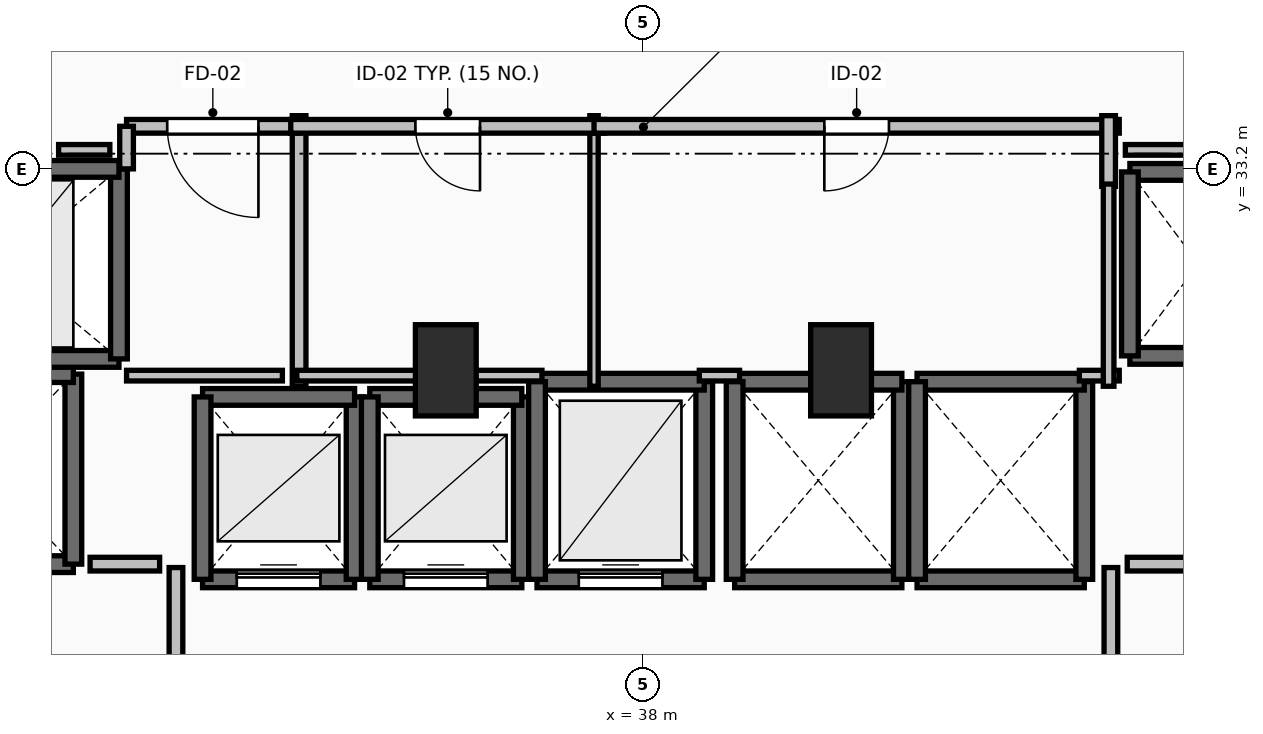
"""IFC4 building model, lengths in metres.
Left out: names, types, materials, properties, quantities, classifications, styles, units other than length and angle.
Written with IfcOpenShell. Run it as: python <this file> out.ifc"""

import sys

from ifc_helpers import new_model, si_unit, direction, frame, frame_2d, origin, origin_2d, place, context, subcontext, project, spatial, rectangle, extrude, element, fill, save


model = new_model("IFC4")
c1 = context("Model", 3, precision=1e-05, world=origin(), true_north=direction((0.0, 1.0)))
c2 = subcontext(c1, "Body", "Model", "MODEL_VIEW")
j1 = project(units=[si_unit("LENGTHUNIT", "METRE"), si_unit("PLANEANGLEUNIT", "RADIAN")], contexts=[c1])
p1 = place(None, origin())
s1 = spatial("IfcSite", under=j1, at=p1, CompositionType="ELEMENT")
p2 = place(p1, origin())
s2 = spatial("IfcBuilding", under=s1, at=p2, CompositionType="ELEMENT")
p3 = place(p2, frame((0.0, 0.0, 120.8)))
s3 = spatial("IfcBuildingStorey", under=s2, at=p3, CompositionType="ELEMENT", Elevation=120.8)
for number, where, z_axis, x_axis in (
    (1, (35.4, 30.55, 0.0), (0.0, 0.0, 1.0), (1.0, 0.0, 0.0)),
    (2, (40.6, 30.55, 0.0), (0.0, 0.0, 1.0), (1.0, 0.0, 0.0)),
):
    element("IfcColumn", number, at=place(p3, frame(where, z_axis=z_axis, x_axis=x_axis)), inside=s3, PredefinedType="PILASTER", context=c2, shape_type="SweptSolid", body=[
        extrude(rectangle(XDim=0.8, YDim=1.2, at=origin_2d()), origin(), (0.0, 0.0, 1.0), 3.5),
    ])
p4 = place(p3, frame((32.2, 27.8, 0.0), z_axis=(0.0, 0.0, 1.0), x_axis=(1.0, 0.0, 0.0)))
e3 = element("IfcWall", 3, at=p4, inside=s3, PredefinedType="SOLIDWALL", context=c2, shape_type="SweptSolid", body=[
    extrude(rectangle(XDim=2.0, YDim=0.22, at=frame_2d((1.0, 0.0))), origin(), (0.0, 0.0, 1.0), 3.15),
])
p5 = place(p4, frame((0.45, 0.0, 0.0)))
e4 = element("IfcOpeningElement", 4, at=p5, cuts=e3, PredefinedType="OPENING", context=c2, shape_type="SweptSolid", body=[
    extrude(rectangle(XDim=1.1, YDim=2.2, at=frame_2d((0.55, 1.1))), frame((0.0, 0.125, 0.0), z_axis=(0.0, -1.0, 0.0), x_axis=(1.0, 0.0, 0.0)), (0.0, 0.0, 1.0), 0.25),
])
p6 = place(p3, frame((34.2, 27.8, 0.0), z_axis=(0.0, 0.0, 1.0), x_axis=(0.0, 1.0, 0.0)))
e5 = element("IfcWall", 5, at=p6, inside=s3, PredefinedType="SOLIDWALL", context=c2, shape_type="SweptSolid", body=[
    extrude(rectangle(XDim=2.4, YDim=0.22, at=frame_2d((1.2, 0.0))), origin(), (0.0, 0.0, 1.0), 3.15),
])
p7 = place(p3, frame((34.2, 30.2, 0.0), z_axis=(0.0, 0.0, 1.0), x_axis=(-1.0, 0.0, 0.0)))
e6 = element("IfcWall", 6, at=p7, inside=s3, PredefinedType="SOLIDWALL", context=c2, shape_type="SweptSolid", body=[
    extrude(rectangle(XDim=2.0, YDim=0.22, at=frame_2d((1.0, 0.0))), origin(), (0.0, 0.0, 1.0), 3.15),
])
p8 = place(p3, frame((32.2, 30.2, 0.0), z_axis=(0.0, 0.0, 1.0), x_axis=(0.0, -1.0, 0.0)))
e7 = element("IfcWall", 7, at=p8, inside=s3, PredefinedType="SOLIDWALL", context=c2, shape_type="SweptSolid", body=[
    extrude(rectangle(XDim=2.4, YDim=0.22, at=frame_2d((1.2, 0.0))), origin(), (0.0, 0.0, 1.0), 3.15),
])
p9 = place(p3, frame((34.4, 27.8, 0.0), z_axis=(0.0, 0.0, 1.0), x_axis=(1.0, 0.0, 0.0)))
e8 = element("IfcWall", 8, at=p9, inside=s3, PredefinedType="SOLIDWALL", context=c2, shape_type="SweptSolid", body=[
    extrude(rectangle(XDim=2.0, YDim=0.22, at=frame_2d((1.0, 0.0))), origin(), (0.0, 0.0, 1.0), 3.15),
])
p10 = place(p9, frame((0.45, 0.0, 0.0)))
e9 = element("IfcOpeningElement", 9, at=p10, cuts=e8, PredefinedType="OPENING", context=c2, shape_type="SweptSolid", body=[
    extrude(rectangle(XDim=1.1, YDim=2.2, at=frame_2d((0.55, 1.1))), frame((0.0, 0.125, 0.0), z_axis=(0.0, -1.0, 0.0), x_axis=(1.0, 0.0, 0.0)), (0.0, 0.0, 1.0), 0.25),
])
p11 = place(p3, frame((36.4, 27.8, 0.0), z_axis=(0.0, 0.0, 1.0), x_axis=(0.0, 1.0, 0.0)))
e10 = element("IfcWall", 10, at=p11, inside=s3, PredefinedType="SOLIDWALL", context=c2, shape_type="SweptSolid", body=[
    extrude(rectangle(XDim=2.4, YDim=0.22, at=frame_2d((1.2, 0.0))), origin(), (0.0, 0.0, 1.0), 3.15),
])
p12 = place(p3, frame((36.4, 30.2, 0.0), z_axis=(0.0, 0.0, 1.0), x_axis=(-1.0, 0.0, 0.0)))
e11 = element("IfcWall", 11, at=p12, inside=s3, PredefinedType="SOLIDWALL", context=c2, shape_type="SweptSolid", body=[
    extrude(rectangle(XDim=2.0, YDim=0.22, at=frame_2d((1.0, 0.0))), origin(), (0.0, 0.0, 1.0), 3.15),
])
p13 = place(p3, frame((34.4, 30.2, 0.0), z_axis=(0.0, 0.0, 1.0), x_axis=(0.0, -1.0, 0.0)))
e12 = element("IfcWall", 12, at=p13, inside=s3, PredefinedType="SOLIDWALL", context=c2, shape_type="SweptSolid", body=[
    extrude(rectangle(XDim=2.4, YDim=0.22, at=frame_2d((1.2, 0.0))), origin(), (0.0, 0.0, 1.0), 3.15),
])
p14 = place(p3, frame((36.6, 27.8, 0.0), z_axis=(0.0, 0.0, 1.0), x_axis=(1.0, 0.0, 0.0)))
e13 = element("IfcWall", 13, at=p14, inside=s3, PredefinedType="SOLIDWALL", context=c2, shape_type="SweptSolid", body=[
    extrude(rectangle(XDim=2.2, YDim=0.22, at=frame_2d((1.1, 0.0))), origin(), (0.0, 0.0, 1.0), 3.15),
])
p15 = place(p14, frame((0.55, 0.0, 0.0)))
e14 = element("IfcOpeningElement", 14, at=p15, cuts=e13, PredefinedType="OPENING", context=c2, shape_type="SweptSolid", body=[
    extrude(rectangle(XDim=1.1, YDim=2.2, at=frame_2d((0.55, 1.1))), frame((0.0, 0.125, 0.0), z_axis=(0.0, -1.0, 0.0), x_axis=(1.0, 0.0, 0.0)), (0.0, 0.0, 1.0), 0.25),
])
p16 = place(p3, frame((38.8, 27.8, 0.0), z_axis=(0.0, 0.0, 1.0), x_axis=(0.0, 1.0, 0.0)))
e15 = element("IfcWall", 15, at=p16, inside=s3, PredefinedType="SOLIDWALL", context=c2, shape_type="SweptSolid", body=[
    extrude(rectangle(XDim=2.6, YDim=0.22, at=frame_2d((1.3, 0.0))), origin(), (0.0, 0.0, 1.0), 3.15),
])
p17 = place(p3, frame((38.8, 30.4, 0.0), z_axis=(0.0, 0.0, 1.0), x_axis=(-1.0, 0.0, 0.0)))
e16 = element("IfcWall", 16, at=p17, inside=s3, PredefinedType="SOLIDWALL", context=c2, shape_type="SweptSolid", body=[
    extrude(rectangle(XDim=2.2, YDim=0.22, at=frame_2d((1.1, 0.0))), origin(), (0.0, 0.0, 1.0), 3.15),
])
p18 = place(p3, frame((36.6, 30.4, 0.0), z_axis=(0.0, 0.0, 1.0), x_axis=(0.0, -1.0, 0.0)))
e17 = element("IfcWall", 17, at=p18, inside=s3, PredefinedType="SOLIDWALL", context=c2, shape_type="SweptSolid", body=[
    extrude(rectangle(XDim=2.6, YDim=0.22, at=frame_2d((1.3, 0.0))), origin(), (0.0, 0.0, 1.0), 3.15),
])
p19 = place(p3, frame((39.2, 27.8, 0.0), z_axis=(0.0, 0.0, 1.0), x_axis=(1.0, 0.0, 0.0)))
e18 = element("IfcWall", 18, at=p19, inside=s3, PredefinedType="SOLIDWALL", context=c2, shape_type="SweptSolid", body=[
    extrude(rectangle(XDim=2.2, YDim=0.22, at=frame_2d((1.1, 0.0))), origin(), (0.0, 0.0, 1.0), 3.15),
])
p20 = place(p3, frame((41.4, 27.8, 0.0), z_axis=(0.0, 0.0, 1.0), x_axis=(0.0, 1.0, 0.0)))
e19 = element("IfcWall", 19, at=p20, inside=s3, PredefinedType="SOLIDWALL", context=c2, shape_type="SweptSolid", body=[
    extrude(rectangle(XDim=2.6, YDim=0.22, at=frame_2d((1.3, 0.0))), origin(), (0.0, 0.0, 1.0), 3.15),
])
p21 = place(p3, frame((41.4, 30.4, 0.0), z_axis=(0.0, 0.0, 1.0), x_axis=(-1.0, 0.0, 0.0)))
e20 = element("IfcWall", 20, at=p21, inside=s3, PredefinedType="SOLIDWALL", context=c2, shape_type="SweptSolid", body=[
    extrude(rectangle(XDim=2.2, YDim=0.22, at=frame_2d((1.1, 0.0))), origin(), (0.0, 0.0, 1.0), 3.15),
])
p22 = place(p3, frame((39.2, 30.4, 0.0), z_axis=(0.0, 0.0, 1.0), x_axis=(0.0, -1.0, 0.0)))
e21 = element("IfcWall", 21, at=p22, inside=s3, PredefinedType="SOLIDWALL", context=c2, shape_type="SweptSolid", body=[
    extrude(rectangle(XDim=2.6, YDim=0.22, at=frame_2d((1.3, 0.0))), origin(), (0.0, 0.0, 1.0), 3.15),
])
p23 = place(p3, frame((41.6, 27.8, 0.0), z_axis=(0.0, 0.0, 1.0), x_axis=(1.0, 0.0, 0.0)))
e22 = element("IfcWall", 22, at=p23, inside=s3, PredefinedType="SOLIDWALL", context=c2, shape_type="SweptSolid", body=[
    extrude(rectangle(XDim=2.2, YDim=0.22, at=frame_2d((1.1, 0.0))), origin(), (0.0, 0.0, 1.0), 3.15),
])
p24 = place(p3, frame((43.8, 27.8, 0.0), z_axis=(0.0, 0.0, 1.0), x_axis=(0.0, 1.0, 0.0)))
e23 = element("IfcWall", 23, at=p24, inside=s3, PredefinedType="SOLIDWALL", context=c2, shape_type="SweptSolid", body=[
    extrude(rectangle(XDim=2.6, YDim=0.22, at=frame_2d((1.3, 0.0))), origin(), (0.0, 0.0, 1.0), 3.15),
])
p25 = place(p3, frame((43.8, 30.4, 0.0), z_axis=(0.0, 0.0, 1.0), x_axis=(-1.0, 0.0, 0.0)))
e24 = element("IfcWall", 24, at=p25, inside=s3, PredefinedType="SOLIDWALL", context=c2, shape_type="SweptSolid", body=[
    extrude(rectangle(XDim=2.2, YDim=0.22, at=frame_2d((1.1, 0.0))), origin(), (0.0, 0.0, 1.0), 3.15),
])
p26 = place(p3, frame((41.6, 30.4, 0.0), z_axis=(0.0, 0.0, 1.0), x_axis=(0.0, -1.0, 0.0)))
e25 = element("IfcWall", 25, at=p26, inside=s3, PredefinedType="SOLIDWALL", context=c2, shape_type="SweptSolid", body=[
    extrude(rectangle(XDim=2.6, YDim=0.22, at=frame_2d((1.3, 0.0))), origin(), (0.0, 0.0, 1.0), 3.15),
])
for number, where, z_axis, x_axis in (
    (26, (44.4, 30.74, 0.0), (0.0, 0.0, 1.0), (1.0, 0.0, 0.0)),
    (27, (46.2, 33.16, 0.0), (0.0, 0.0, 1.0), (-1.0, 0.0, 0.0)),
):
    element("IfcWall", number, at=place(p3, frame(where, z_axis=z_axis, x_axis=x_axis)), inside=s3, PredefinedType="SOLIDWALL", context=c2, shape_type="SweptSolid", body=[
        extrude(rectangle(XDim=1.8, YDim=0.22, at=frame_2d((0.9, 0.0))), origin(), (0.0, 0.0, 1.0), 3.15),
    ])
p27 = place(p3, frame((44.4, 33.16, 0.0), z_axis=(0.0, 0.0, 1.0), x_axis=(0.0, -1.0, 0.0)))
e28 = element("IfcWall", 28, at=p27, inside=s3, PredefinedType="SOLIDWALL", context=c2, shape_type="SweptSolid", body=[
    extrude(rectangle(XDim=2.42, YDim=0.22, at=frame_2d((1.21, 0.0))), origin(), (0.0, 0.0, 1.0), 3.15),
])
p28 = place(p3, frame((28.1, 28.0, 0.0), z_axis=(0.0, 0.0, 1.0), x_axis=(1.0, 0.0, 0.0)))
e29 = element("IfcWall", 29, at=p28, inside=s3, PredefinedType="SHEAR", context=c2, shape_type="SweptSolid", body=[
    extrude(rectangle(XDim=2.4, YDim=0.22, at=frame_2d((1.2, 0.0))), origin(), (0.0, 0.0, 1.0), 3.15),
])
p29 = place(p28, frame((0.6, 0.0, 0.0)))
e30 = element("IfcOpeningElement", 30, at=p29, cuts=e29, PredefinedType="OPENING", context=c2, shape_type="SweptSolid", body=[
    extrude(rectangle(XDim=1.2, YDim=2.2, at=frame_2d((0.6, 1.1))), frame((0.0, 0.125, 0.0), z_axis=(0.0, -1.0, 0.0), x_axis=(1.0, 0.0, 0.0)), (0.0, 0.0, 1.0), 0.25),
])
p30 = place(p3, frame((30.5, 28.0, 0.0), z_axis=(0.0, 0.0, 1.0), x_axis=(0.0, 1.0, 0.0)))
e31 = element("IfcWall", 31, at=p30, inside=s3, PredefinedType="SHEAR", context=c2, shape_type="SweptSolid", body=[
    extrude(rectangle(XDim=2.5, YDim=0.22, at=frame_2d((1.25, 0.0))), origin(), (0.0, 0.0, 1.0), 3.15),
])
p31 = place(p3, frame((30.5, 30.5, 0.0), z_axis=(0.0, 0.0, 1.0), x_axis=(-1.0, 0.0, 0.0)))
e32 = element("IfcWall", 32, at=p31, inside=s3, PredefinedType="SHEAR", context=c2, shape_type="SweptSolid", body=[
    extrude(rectangle(XDim=2.4, YDim=0.22, at=frame_2d((1.2, 0.0))), origin(), (0.0, 0.0, 1.0), 3.15),
])
p32 = place(p3, frame((28.1, 30.7, 0.0), z_axis=(0.0, 0.0, 1.0), x_axis=(1.0, 0.0, 0.0)))
e33 = element("IfcWall", 33, at=p32, inside=s3, PredefinedType="SOLIDWALL", context=c2, shape_type="SweptSolid", body=[
    extrude(rectangle(XDim=3.0, YDim=0.22, at=frame_2d((1.5, 0.0))), origin(), (0.0, 0.0, 1.0), 3.15),
])
p33 = place(p3, frame((31.1, 30.7, 0.0), z_axis=(0.0, 0.0, 1.0), x_axis=(0.0, 1.0, 0.0)))
e34 = element("IfcWall", 34, at=p33, inside=s3, PredefinedType="SOLIDWALL", context=c2, shape_type="SweptSolid", body=[
    extrude(rectangle(XDim=2.5, YDim=0.22, at=frame_2d((1.25, 0.0))), origin(), (0.0, 0.0, 1.0), 3.15),
])
p34 = place(p3, frame((31.1, 33.2, 0.0), z_axis=(0.0, 0.0, 1.0), x_axis=(-1.0, 0.0, 0.0)))
e35 = element("IfcWall", 35, at=p34, inside=s3, PredefinedType="SOLIDWALL", context=c2, shape_type="SweptSolid", body=[
    extrude(rectangle(XDim=3.0, YDim=0.22, at=frame_2d((1.5, 0.0))), origin(), (0.0, 0.0, 1.0), 3.15),
])
p35 = place(p34, frame((0.9, 0.0, 0.0)))
e36 = element("IfcOpeningElement", 36, at=p35, cuts=e35, PredefinedType="OPENING", context=c2, shape_type="SweptSolid", body=[
    extrude(rectangle(XDim=1.2, YDim=2.2, at=frame_2d((0.6, 1.1))), frame((0.0, 0.125, 0.0), z_axis=(0.0, -1.0, 0.0), x_axis=(1.0, 0.0, 0.0)), (0.0, 0.0, 1.0), 0.25),
])
p36 = place(p3, frame((31.85, 24.045, 0.0), z_axis=(0.0, 0.0, 1.0), x_axis=(0.0, 1.0, 0.0)))
e37 = element("IfcWall", 37, at=p36, inside=s3, PredefinedType="PARTITIONING", context=c2, shape_type="SweptSolid", body=[
    extrude(rectangle(XDim=3.91, YDim=0.18, at=frame_2d((1.955, 0.0))), origin(), (0.0, 0.0, 1.0), 3.15),
])
p37 = place(p36, frame((1.355, 0.0, 0.0)))
e38 = element("IfcOpeningElement", 38, at=p37, cuts=e37, PredefinedType="OPENING", context=c2, shape_type="SweptSolid", body=[
    extrude(rectangle(XDim=1.2, YDim=2.15, at=frame_2d((0.6, 1.075))), frame((0.0, 0.105, 0.0), z_axis=(0.0, -1.0, 0.0), x_axis=(1.0, 0.0, 0.0)), (0.0, 0.0, 1.0), 0.21),
])
p38 = place(p3, frame((44.15, 27.955, 0.0), z_axis=(0.0, 0.0, 1.0), x_axis=(0.0, -1.0, 0.0)))
e39 = element("IfcWall", 39, at=p38, inside=s3, PredefinedType="PARTITIONING", context=c2, shape_type="SweptSolid", body=[
    extrude(rectangle(XDim=3.91, YDim=0.18, at=frame_2d((1.955, 0.0))), origin(), (0.0, 0.0, 1.0), 3.15),
])
p39 = place(p38, frame((1.355, 0.0, 0.0)))
e40 = element("IfcOpeningElement", 40, at=p39, cuts=e39, PredefinedType="OPENING", context=c2, shape_type="SweptSolid", body=[
    extrude(rectangle(XDim=1.2, YDim=2.15, at=frame_2d((0.6, 1.075))), frame((0.0, 0.105, 0.0), z_axis=(0.0, -1.0, 0.0), x_axis=(1.0, 0.0, 0.0)), (0.0, 0.0, 1.0), 0.21),
])
p40 = place(p3, frame((33.47, 30.34, 0.0), z_axis=(0.0, 0.0, 1.0), x_axis=(0.0, 1.0, 0.0)))
e41 = element("IfcWall", 41, at=p40, inside=s3, PredefinedType="PARTITIONING", context=c2, shape_type="SweptSolid", body=[
    extrude(rectangle(XDim=3.56, YDim=0.18, at=frame_2d((1.78, 0.0))), origin(), (0.0, 0.0, 1.0), 3.15),
])
p41 = place(p3, frame((33.47, 33.76, 0.0), z_axis=(0.0, 0.0, 1.0), x_axis=(-1.0, 0.0, 0.0)))
e42 = element("IfcWall", 42, at=p41, inside=s3, PredefinedType="PARTITIONING", context=c2, shape_type="SweptSolid", body=[
    extrude(rectangle(XDim=2.27, YDim=0.18, at=frame_2d((1.135, 0.0))), origin(), (0.0, 0.0, 1.0), 3.15),
])
p42 = place(p41, frame((0.535, 0.0, 0.0)))
e43 = element("IfcOpeningElement", 43, at=p42, cuts=e42, PredefinedType="OPENING", context=c2, shape_type="SweptSolid", body=[
    extrude(rectangle(XDim=1.2, YDim=2.15, at=frame_2d((0.6, 1.075))), frame((0.0, 0.105, 0.0), z_axis=(0.0, -1.0, 0.0), x_axis=(1.0, 0.0, 0.0)), (0.0, 0.0, 1.0), 0.21),
])
p43 = place(p3, frame((31.2, 33.76, 0.0), z_axis=(0.0, 0.0, 1.0), x_axis=(0.0, -1.0, 0.0)))
e44 = element("IfcWall", 44, at=p43, inside=s3, PredefinedType="PARTITIONING", context=c2, shape_type="SweptSolid", body=[
    extrude(rectangle(XDim=0.56, YDim=0.18, at=frame_2d((0.28, 0.0))), origin(), (0.0, 0.0, 1.0), 3.15),
])
p44 = place(p3, frame((37.35, 30.34, 0.0), z_axis=(0.0, 0.0, 1.0), x_axis=(0.0, 1.0, 0.0)))
e45 = element("IfcWall", 45, at=p44, inside=s3, PredefinedType="PARTITIONING", context=c2, shape_type="SweptSolid", body=[
    extrude(rectangle(XDim=3.56, YDim=0.11, at=frame_2d((1.78, 0.0))), origin(), (0.0, 0.0, 1.0), 2.342),
])
p45 = place(p3, frame((37.49, 33.76, 0.0), z_axis=(0.0, 0.0, 1.0), x_axis=(-1.0, 0.0, 0.0)))
e46 = element("IfcWall", 46, at=p45, inside=s3, PredefinedType="PARTITIONING", context=c2, shape_type="SweptSolid", body=[
    extrude(rectangle(XDim=4.13, YDim=0.18, at=frame_2d((2.065, 0.0))), origin(), (0.0, 0.0, 1.0), 3.15),
])
p46 = place(p45, frame((1.64, 0.0, 0.0)))
e47 = element("IfcOpeningElement", 47, at=p46, cuts=e46, PredefinedType="OPENING", context=c2, shape_type="SweptSolid", body=[
    extrude(rectangle(XDim=0.85, YDim=2.1, at=frame_2d((0.425, 1.05))), frame((0.0, 0.105, 0.0), z_axis=(0.0, -1.0, 0.0), x_axis=(1.0, 0.0, 0.0)), (0.0, 0.0, 1.0), 0.21),
])
p47 = place(p3, frame((44.26, 33.76, 0.0), z_axis=(0.0, 0.0, 1.0), x_axis=(-1.0, 0.0, 0.0)))
e48 = element("IfcWall", 48, at=p47, inside=s3, PredefinedType="PARTITIONING", context=c2, shape_type="SweptSolid", body=[
    extrude(rectangle(XDim=6.91, YDim=0.18, at=frame_2d((3.455, 0.0))), origin(), (0.0, 0.0, 1.0), 3.15),
])
p48 = place(p47, frame((3.03, 0.0, 0.0)))
e49 = element("IfcOpeningElement", 49, at=p48, cuts=e48, PredefinedType="OPENING", context=c2, shape_type="SweptSolid", body=[
    extrude(rectangle(XDim=0.85, YDim=2.1, at=frame_2d((0.425, 1.05))), frame((0.0, 0.105, 0.0), z_axis=(0.0, -1.0, 0.0), x_axis=(1.0, 0.0, 0.0)), (0.0, 0.0, 1.0), 0.21),
])
p49 = place(p3, frame((44.12, 32.97, 0.0), z_axis=(0.0, 0.0, 1.0), x_axis=(0.0, 1.0, 0.0)))
e50 = element("IfcWall", 50, at=p49, inside=s3, PredefinedType="PARTITIONING", context=c2, shape_type="SweptSolid", body=[
    extrude(rectangle(XDim=0.93, YDim=0.18, at=frame_2d((0.465, 0.0))), origin(), (0.0, 0.0, 1.0), 3.15),
])
for number, where, z_axis, x_axis in (
    (51, (31.635, 28.0, 0.0), (0.0, 0.0, 1.0), (-1.0, 0.0, 0.0)),
    (52, (45.28, 28.0, 0.0), (0.0, 0.0, 1.0), (-1.0, 0.0, 0.0)),
):
    element("IfcWall", number, at=place(p3, frame(where, z_axis=z_axis, x_axis=x_axis)), inside=s3, PredefinedType="PARTITIONING", context=c2, shape_type="SweptSolid", body=[
        extrude(rectangle(XDim=0.915, YDim=0.18, at=frame_2d((0.458, 0.0))), origin(), (0.0, 0.0, 1.0), 3.15),
    ])
p50 = place(p3, frame((31.2, 30.48, 0.0), z_axis=(0.0, 0.0, 1.0), x_axis=(1.0, 0.0, 0.0)))
e53 = element("IfcWall", 53, at=p50, inside=s3, PredefinedType="PARTITIONING", context=c2, shape_type="SweptSolid", body=[
    extrude(rectangle(XDim=2.05, YDim=0.14, at=frame_2d((1.025, 0.0))), origin(), (0.0, 0.0, 1.0), 3.15),
])
p51 = place(p3, frame((33.44, 30.48, 0.0), z_axis=(0.0, 0.0, 1.0), x_axis=(1.0, 0.0, 0.0)))
e54 = element("IfcWall", 54, at=p51, inside=s3, PredefinedType="PARTITIONING", context=c2, shape_type="SweptSolid", body=[
    extrude(rectangle(XDim=3.225, YDim=0.14, at=frame_2d((1.613, 0.0))), origin(), (0.0, 0.0, 1.0), 2.342),
])
p52 = place(p3, frame((38.735, 30.48, 0.0), z_axis=(0.0, 0.0, 1.0), x_axis=(1.0, 0.0, 0.0)))
e55 = element("IfcWall", 55, at=p52, inside=s3, PredefinedType="PARTITIONING", context=c2, shape_type="SweptSolid", body=[
    extrude(rectangle(XDim=0.53, YDim=0.14, at=frame_2d((0.265, 0.0))), origin(), (0.0, 0.0, 1.0), 2.342),
])
p53 = place(p3, frame((43.735, 30.48, 0.0), z_axis=(0.0, 0.0, 1.0), x_axis=(1.0, 0.0, 0.0)))
e56 = element("IfcWall", 56, at=p53, inside=s3, PredefinedType="PARTITIONING", context=c2, shape_type="SweptSolid", body=[
    extrude(rectangle(XDim=0.525, YDim=0.14, at=frame_2d((0.262, 0.0))), origin(), (0.0, 0.0, 1.0), 3.15),
])
p54 = place(p3, frame((44.12, 30.34, 0.0), z_axis=(0.0, 0.0, 1.0), x_axis=(0.0, 1.0, 0.0)))
e57 = element("IfcWall", 57, at=p54, inside=s3, PredefinedType="PARTITIONING", context=c2, shape_type="SweptSolid", body=[
    extrude(rectangle(XDim=2.66, YDim=0.14, at=frame_2d((1.33, 0.0))), origin(), (0.0, 0.0, 1.0), 3.15),
])
p55 = place(p3, frame((44.34, 33.45, 0.0), z_axis=(0.0, 0.0, 1.0), x_axis=(1.0, 0.0, 0.0)))
e58 = element("IfcWall", 58, at=p55, inside=s3, PredefinedType="PARTITIONING", context=c2, shape_type="SweptSolid", body=[
    extrude(rectangle(XDim=4.21, YDim=0.14, at=frame_2d((2.105, 0.0))), origin(), (0.0, 0.0, 1.0), 2.342),
])
p56 = place(p3, frame((30.306, 33.45, 0.0), z_axis=(0.0, 0.0, 1.0), x_axis=(1.0, 0.0, 0.0)))
e59 = element("IfcWall", 59, at=p56, inside=s3, PredefinedType="PARTITIONING", context=c2, shape_type="SweptSolid", body=[
    extrude(rectangle(XDim=0.674, YDim=0.14, at=frame_2d((0.337, 0.0))), origin(), (0.0, 0.0, 1.0), 3.15),
])
p57 = place(p5, origin())
e60 = element("IfcDoor", 60, at=p57, inside=s3, OperationType="SLIDING_TO_LEFT", PredefinedType="DOOR", context=c2, shape_type="SweptSolid", body=[
    extrude(rectangle(XDim=1.1, YDim=2.2, at=frame_2d((0.55, 1.1))), frame((0.0, 0.025, 0.0), z_axis=(0.0, -1.0, 0.0), x_axis=(1.0, 0.0, 0.0)), (0.0, 0.0, 1.0), 0.05),
])
fill(e4, e60)
p58 = place(p10, origin())
e61 = element("IfcDoor", 61, at=p58, inside=s3, OperationType="SLIDING_TO_LEFT", PredefinedType="DOOR", context=c2, shape_type="SweptSolid", body=[
    extrude(rectangle(XDim=1.1, YDim=2.2, at=frame_2d((0.55, 1.1))), frame((0.0, 0.025, 0.0), z_axis=(0.0, -1.0, 0.0), x_axis=(1.0, 0.0, 0.0)), (0.0, 0.0, 1.0), 0.05),
])
fill(e9, e61)
p59 = place(p15, origin())
e62 = element("IfcDoor", 62, at=p59, inside=s3, OperationType="SLIDING_TO_LEFT", PredefinedType="DOOR", context=c2, shape_type="SweptSolid", body=[
    extrude(rectangle(XDim=1.1, YDim=2.2, at=frame_2d((0.55, 1.1))), frame((0.0, 0.025, 0.0), z_axis=(0.0, -1.0, 0.0), x_axis=(1.0, 0.0, 0.0)), (0.0, 0.0, 1.0), 0.05),
])
fill(e14, e62)
p60 = place(p42, origin())
e63 = element("IfcDoor", 63, at=p60, inside=s3, OperationType="SINGLE_SWING_LEFT", PredefinedType="DOOR", context=c2, shape_type="SweptSolid", body=[
    extrude(rectangle(XDim=1.2, YDim=2.15, at=frame_2d((0.6, 1.075))), frame((0.0, 0.025, 0.0), z_axis=(0.0, -1.0, 0.0), x_axis=(1.0, 0.0, 0.0)), (0.0, 0.0, 1.0), 0.05),
])
fill(e43, e63)
p61 = place(p46, origin())
e64 = element("IfcDoor", 64, at=p61, inside=s3, OperationType="SINGLE_SWING_LEFT", PredefinedType="DOOR", context=c2, shape_type="SweptSolid", body=[
    extrude(rectangle(XDim=0.85, YDim=2.1, at=frame_2d((0.425, 1.05))), frame((0.0, 0.025, 0.0), z_axis=(0.0, -1.0, 0.0), x_axis=(1.0, 0.0, 0.0)), (0.0, 0.0, 1.0), 0.05),
])
fill(e47, e64)
p62 = place(p48, origin())
e65 = element("IfcDoor", 65, at=p62, inside=s3, OperationType="SINGLE_SWING_RIGHT", PredefinedType="DOOR", context=c2, shape_type="SweptSolid", body=[
    extrude(rectangle(XDim=0.85, YDim=2.1, at=frame_2d((0.425, 1.05))), frame((0.0, 0.025, 0.0), z_axis=(0.0, -1.0, 0.0), x_axis=(1.0, 0.0, 0.0)), (0.0, 0.0, 1.0), 0.05),
])
fill(e49, e65)
save(model, sys.argv[1])
